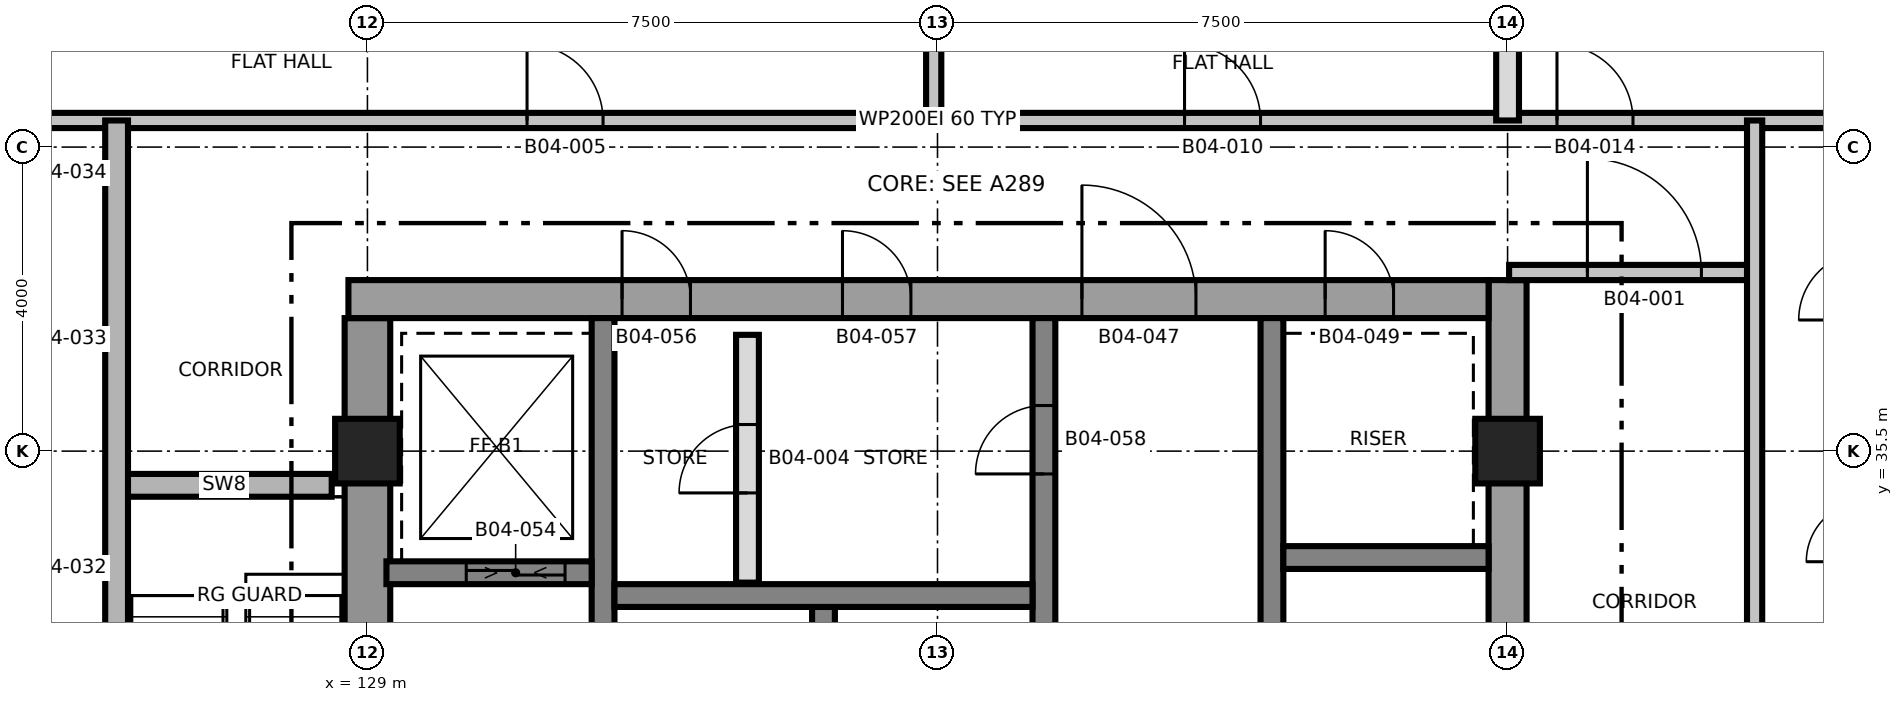
"""IFC4 building model, lengths in metres.
Left out: names, types, materials, properties, quantities, classifications, styles, units other than length and angle.
Written with IfcOpenShell. Run it as: python <this file> out.ifc"""

import sys

from ifc_helpers import new_model, si_unit, direction, frame, frame_2d, origin, origin_2d, place, context, subcontext, project, spatial, rectangle, extrude, element, fill, save


model = new_model("IFC4")
c1 = context("Model", 3, precision=1e-05, world=origin(), true_north=direction((0.0, 1.0)))
c2 = subcontext(c1, "Body", "Model", "MODEL_VIEW")
j1 = project(units=[si_unit("LENGTHUNIT", "METRE"), si_unit("PLANEANGLEUNIT", "RADIAN")], contexts=[c1])
p1 = place(None, origin())
s1 = spatial("IfcSite", under=j1, at=p1, CompositionType="ELEMENT")
p2 = place(p1, origin())
s2 = spatial("IfcBuilding", under=s1, at=p2, CompositionType="ELEMENT")
p3 = place(p2, frame((0.0, 0.0, 66.8)))
s3 = spatial("IfcBuildingStorey", under=s2, at=p3, CompositionType="ELEMENT", Elevation=66.8)
p4 = place(p3, frame((129.0, 24.75, 0.0), z_axis=(0.0, 0.0, 1.0), x_axis=(0.0, 1.0, 0.0)))
e1 = element("IfcWall", 1, at=p4, inside=s3, PredefinedType="SHEAR", context=c2, shape_type="SweptSolid", body=[
    extrude(rectangle(XDim=12.5, YDim=0.6, at=frame_2d((6.25, 0.0))), origin(), (0.0, 0.0, 1.0), 3.7),
])
p5 = place(p4, frame((5.15, 0.0, 0.0)))
e2 = element("IfcOpeningElement", 2, at=p5, cuts=e1, PredefinedType="OPENING", context=c2, shape_type="SweptSolid", body=[
    extrude(rectangle(XDim=1.0, YDim=2.1, at=frame_2d((0.5, 1.05))), frame((0.0, 0.31, 0.0), z_axis=(0.0, -1.0, 0.0), x_axis=(1.0, 0.0, 0.0)), (0.0, 0.0, 1.0), 0.62),
])
p6 = place(p3, frame((144.0, 24.25, 0.0), z_axis=(0.0, 0.0, 1.0), x_axis=(0.0, 1.0, 0.0)))
e3 = element("IfcWall", 3, at=p6, inside=s3, PredefinedType="SHEAR", context=c2, shape_type="SweptSolid", body=[
    extrude(rectangle(XDim=13.5, YDim=0.5, at=frame_2d((6.75, 0.0))), origin(), (0.0, 0.0, 1.0), 3.7),
])
p7 = place(p3, frame((128.75, 37.5, 0.0), z_axis=(0.0, 0.0, 1.0), x_axis=(1.0, 0.0, 0.0)))
e4 = element("IfcWall", 4, at=p7, inside=s3, PredefinedType="SHEAR", context=c2, shape_type="SweptSolid", body=[
    extrude(rectangle(XDim=15.0, YDim=0.5, at=frame_2d((7.5, 0.0))), origin(), (0.0, 0.0, 1.0), 3.7),
])
p8 = place(p7, frame((9.65, 0.0, 0.0)))
e5 = element("IfcOpeningElement", 5, at=p8, cuts=e4, PredefinedType="OPENING", context=c2, shape_type="SweptSolid", body=[
    extrude(rectangle(XDim=1.5, YDim=2.1, at=frame_2d((0.75, 1.05))), frame((0.0, 0.26, 0.0), z_axis=(0.0, -1.0, 0.0), x_axis=(1.0, 0.0, 0.0)), (0.0, 0.0, 1.0), 0.52),
])
p9 = place(p7, frame((12.85, 0.0, 0.0)))
e6 = element("IfcOpeningElement", 6, at=p9, cuts=e4, PredefinedType="OPENING", context=c2, shape_type="SweptSolid", body=[
    extrude(rectangle(XDim=0.9, YDim=2.1, at=frame_2d((0.45, 1.05))), frame((0.0, 0.26, 0.0), z_axis=(0.0, -1.0, 0.0), x_axis=(1.0, 0.0, 0.0)), (0.0, 0.0, 1.0), 0.52),
])
p10 = place(p7, frame((3.6, 0.0, 0.0)))
e7 = element("IfcOpeningElement", 7, at=p10, cuts=e4, PredefinedType="OPENING", context=c2, shape_type="SweptSolid", body=[
    extrude(rectangle(XDim=0.9, YDim=2.1, at=frame_2d((0.45, 1.05))), frame((0.0, 0.26, 0.0), z_axis=(0.0, -1.0, 0.0), x_axis=(1.0, 0.0, 0.0)), (0.0, 0.0, 1.0), 0.52),
])
p11 = place(p7, frame((6.5, 0.0, 0.0)))
e8 = element("IfcOpeningElement", 8, at=p11, cuts=e4, PredefinedType="OPENING", context=c2, shape_type="SweptSolid", body=[
    extrude(rectangle(XDim=0.9, YDim=2.1, at=frame_2d((0.45, 1.05))), frame((0.0, 0.26, 0.0), z_axis=(0.0, -1.0, 0.0), x_axis=(1.0, 0.0, 0.0)), (0.0, 0.0, 1.0), 0.52),
])
p12 = place(p3, frame((132.1, 24.75, 0.0), z_axis=(0.0, 0.0, 1.0), x_axis=(0.0, 1.0, 0.0)))
e9 = element("IfcWall", 9, at=p12, inside=s3, PredefinedType="SHEAR", context=c2, shape_type="SweptSolid", body=[
    extrude(rectangle(XDim=12.5, YDim=0.3, at=frame_2d((6.25, 0.0))), origin(), (0.0, 0.0, 1.0), 3.7),
])
p13 = place(p12, frame((3.9, 0.0, 0.0)))
e10 = element("IfcOpeningElement", 10, at=p13, cuts=e9, PredefinedType="OPENING", context=c2, shape_type="SweptSolid", body=[
    extrude(rectangle(XDim=1.2, YDim=2.1, at=frame_2d((0.6, 1.05))), frame((0.0, 0.16, 0.0), z_axis=(0.0, -1.0, 0.0), x_axis=(1.0, 0.0, 0.0)), (0.0, 0.0, 1.0), 0.32),
])
p14 = place(p3, frame((137.9, 24.75, 0.0), z_axis=(0.0, 0.0, 1.0), x_axis=(0.0, 1.0, 0.0)))
e11 = element("IfcWall", 11, at=p14, inside=s3, PredefinedType="SHEAR", context=c2, shape_type="SweptSolid", body=[
    extrude(rectangle(XDim=12.5, YDim=0.3, at=frame_2d((6.25, 0.0))), origin(), (0.0, 0.0, 1.0), 3.7),
])
p15 = place(p14, frame((3.95, 0.0, 0.0)))
e12 = element("IfcOpeningElement", 12, at=p15, cuts=e11, PredefinedType="OPENING", context=c2, shape_type="SweptSolid", body=[
    extrude(rectangle(XDim=1.5, YDim=2.1, at=frame_2d((0.75, 1.05))), frame((0.0, 0.16, 0.0), z_axis=(0.0, -1.0, 0.0), x_axis=(1.0, 0.0, 0.0)), (0.0, 0.0, 1.0), 0.32),
])
p16 = place(p14, frame((10.45, 0.0, 0.0)))
e13 = element("IfcOpeningElement", 13, at=p16, cuts=e11, PredefinedType="OPENING", context=c2, shape_type="SweptSolid", body=[
    extrude(rectangle(XDim=0.9, YDim=2.1, at=frame_2d((0.45, 1.05))), frame((0.0, 0.16, 0.0), z_axis=(0.0, -1.0, 0.0), x_axis=(1.0, 0.0, 0.0)), (0.0, 0.0, 1.0), 0.32),
])
p17 = place(p3, frame((140.9, 24.75, 0.0), z_axis=(0.0, 0.0, 1.0), x_axis=(0.0, 1.0, 0.0)))
e14 = element("IfcWall", 14, at=p17, inside=s3, PredefinedType="SHEAR", context=c2, shape_type="SweptSolid", body=[
    extrude(rectangle(XDim=12.5, YDim=0.3, at=frame_2d((6.25, 0.0))), origin(), (0.0, 0.0, 1.0), 3.7),
])
p18 = place(p17, frame((5.9, 0.0, 0.0)))
e15 = element("IfcOpeningElement", 15, at=p18, cuts=e14, PredefinedType="OPENING", context=c2, shape_type="SweptSolid", body=[
    extrude(rectangle(XDim=1.2, YDim=2.1, at=frame_2d((0.6, 1.05))), frame((0.0, 0.16, 0.0), z_axis=(0.0, -1.0, 0.0), x_axis=(1.0, 0.0, 0.0)), (0.0, 0.0, 1.0), 0.32),
])
p19 = place(p3, frame((135.0, 30.85, 0.0), z_axis=(0.0, 0.0, 1.0), x_axis=(0.0, 1.0, 0.0)))
e16 = element("IfcWall", 16, at=p19, inside=s3, PredefinedType="SHEAR", context=c2, shape_type="SweptSolid", body=[
    extrude(rectangle(XDim=2.6, YDim=0.3, at=frame_2d((1.3, 0.0))), origin(), (0.0, 0.0, 1.0), 3.7),
])
p20 = place(p3, frame((132.25, 33.6, 0.0), z_axis=(0.0, 0.0, 1.0), x_axis=(1.0, 0.0, 0.0)))
e17 = element("IfcWall", 17, at=p20, inside=s3, PredefinedType="SHEAR", context=c2, shape_type="SweptSolid", body=[
    extrude(rectangle(XDim=5.5, YDim=0.3, at=frame_2d((2.75, 0.0))), origin(), (0.0, 0.0, 1.0), 3.7),
])
p21 = place(p3, frame((129.25, 33.9, 0.0), z_axis=(0.0, 0.0, 1.0), x_axis=(1.0, 0.0, 0.0)))
e18 = element("IfcWall", 18, at=p21, inside=s3, PredefinedType="SHEAR", context=c2, shape_type="SweptSolid", body=[
    extrude(rectangle(XDim=2.7, YDim=0.3, at=frame_2d((1.35, 0.0))), origin(), (0.0, 0.0, 1.0), 3.7),
])
p22 = place(p21, frame((1.05, 0.0, 0.0)))
e19 = element("IfcOpeningElement", 19, at=p22, cuts=e18, PredefinedType="OPENING", context=c2, shape_type="SweptSolid", body=[
    extrude(rectangle(XDim=1.3, YDim=2.4, at=frame_2d((0.65, 1.2))), frame((0.0, 0.16, 0.0), z_axis=(0.0, -1.0, 0.0), x_axis=(1.0, 0.0, 0.0)), (0.0, 0.0, 1.0), 0.32),
])
p23 = place(p3, frame((141.05, 34.1, 0.0), z_axis=(0.0, 0.0, 1.0), x_axis=(1.0, 0.0, 0.0)))
e20 = element("IfcWall", 20, at=p23, inside=s3, PredefinedType="SHEAR", context=c2, shape_type="SweptSolid", body=[
    extrude(rectangle(XDim=2.7, YDim=0.3, at=frame_2d((1.35, 0.0))), origin(), (0.0, 0.0, 1.0), 3.7),
])
for number, where, z_axis, x_axis in (
    (21, (129.0, 35.5, 0.0), (0.0, 0.0, 1.0), (1.0, 0.0, 0.0)),
    (22, (144.0, 35.5, 0.0), (0.0, 0.0, 1.0), (1.0, 0.0, 0.0)),
):
    element("IfcColumn", number, at=place(p3, frame(where, z_axis=z_axis, x_axis=x_axis)), inside=s3, PredefinedType="COLUMN", context=c2, shape_type="SweptSolid", body=[
        extrude(rectangle(XDim=0.85, YDim=0.85, at=origin_2d()), origin(), (0.0, 0.0, 1.0), 3.7),
    ])
p24 = place(p3, frame((125.7, 35.05, 0.0), z_axis=(0.0, 0.0, 1.0), x_axis=(1.0, 0.0, 0.0)))
e23 = element("IfcWall", 23, at=p24, inside=s3, PredefinedType="SHEAR", context=c2, shape_type="SweptSolid", body=[
    extrude(rectangle(XDim=2.83, YDim=0.3, at=frame_2d((1.415, 0.0))), origin(), (0.0, 0.0, 1.0), 3.4),
])
p25 = place(p3, frame((144.02, 37.85, 0.0), z_axis=(0.0, 0.0, 1.0), x_axis=(1.0, 0.0, 0.0)))
e24 = element("IfcWall", 24, at=p25, inside=s3, PredefinedType="PARTITIONING", context=c2, shape_type="SweptSolid", body=[
    extrude(rectangle(XDim=3.23, YDim=0.2, at=frame_2d((1.615, 0.0))), origin(), (0.0, 0.0, 1.0), 3.4),
])
p26 = place(p25, frame((1.03, 0.0, 0.0)))
e25 = element("IfcOpeningElement", 25, at=p26, cuts=e24, PredefinedType="OPENING", context=c2, shape_type="SweptSolid", body=[
    extrude(rectangle(XDim=1.5, YDim=2.1, at=frame_2d((0.75, 1.05))), frame((0.0, 0.11, 0.0), z_axis=(0.0, -1.0, 0.0), x_axis=(1.0, 0.0, 0.0)), (0.0, 0.0, 1.0), 0.22),
])
p27 = place(p3, frame((119.17, 39.85, 0.0), z_axis=(0.0, 0.0, 1.0), x_axis=(1.0, 0.0, 0.0)))
e26 = element("IfcWall", 26, at=p27, inside=s3, PredefinedType="PARTITIONING", context=c2, shape_type="SweptSolid", body=[
    extrude(rectangle(XDim=34.66, YDim=0.2, at=frame_2d((17.33, 0.0))), origin(), (0.0, 0.0, 1.0), 3.4),
])
p28 = place(p27, frame((11.93, 0.0, 0.0)))
e27 = element("IfcOpeningElement", 27, at=p28, cuts=e26, PredefinedType="OPENING", context=c2, shape_type="SweptSolid", body=[
    extrude(rectangle(XDim=1.0, YDim=2.1, at=frame_2d((0.5, 1.05))), frame((0.0, 0.11, 0.0), z_axis=(0.0, -1.0, 0.0), x_axis=(1.0, 0.0, 0.0)), (0.0, 0.0, 1.0), 0.22),
])
p29 = place(p27, frame((20.58, 0.0, 0.0)))
e28 = element("IfcOpeningElement", 28, at=p29, cuts=e26, PredefinedType="OPENING", context=c2, shape_type="SweptSolid", body=[
    extrude(rectangle(XDim=1.0, YDim=2.1, at=frame_2d((0.5, 1.05))), frame((0.0, 0.11, 0.0), z_axis=(0.0, -1.0, 0.0), x_axis=(1.0, 0.0, 0.0)), (0.0, 0.0, 1.0), 0.22),
])
p30 = place(p27, frame((25.48, 0.0, 0.0)))
e29 = element("IfcOpeningElement", 29, at=p30, cuts=e26, PredefinedType="OPENING", context=c2, shape_type="SweptSolid", body=[
    extrude(rectangle(XDim=1.0, YDim=2.1, at=frame_2d((0.5, 1.05))), frame((0.0, 0.11, 0.0), z_axis=(0.0, -1.0, 0.0), x_axis=(1.0, 0.0, 0.0)), (0.0, 0.0, 1.0), 0.22),
])
p31 = place(p3, frame((125.7, 22.15, 0.0), z_axis=(0.0, 0.0, 1.0), x_axis=(0.0, 1.0, 0.0)))
e30 = element("IfcWall", 30, at=p31, inside=s3, PredefinedType="SHEAR", context=c2, shape_type="SweptSolid", body=[
    extrude(rectangle(XDim=17.7, YDim=0.3, at=frame_2d((8.85, 0.0))), origin(), (0.0, 0.0, 1.0), 3.4),
])
p32 = place(p31, frame((2.7, 0.0, 0.0)))
e31 = element("IfcOpeningElement", 31, at=p32, cuts=e30, PredefinedType="OPENING", context=c2, shape_type="SweptSolid", body=[
    extrude(rectangle(XDim=1.0, YDim=2.1, at=frame_2d((0.5, 1.05))), frame((0.0, 0.16, 0.0), z_axis=(0.0, -1.0, 0.0), x_axis=(1.0, 0.0, 0.0)), (0.0, 0.0, 1.0), 0.32),
])
p33 = place(p3, frame((134.0, 33.77, 0.0), z_axis=(0.0, 0.0, 1.0), x_axis=(0.0, 1.0, 0.0)))
e32 = element("IfcWall", 32, at=p33, inside=s3, PredefinedType="PARTITIONING", context=c2, shape_type="SweptSolid", body=[
    extrude(rectangle(XDim=3.26, YDim=0.3, at=frame_2d((1.63, 0.0))), origin(), (0.0, 0.0, 1.0), 3.4),
])
p34 = place(p33, frame((1.18, 0.0, 0.0)))
e33 = element("IfcOpeningElement", 33, at=p34, cuts=e32, PredefinedType="OPENING", context=c2, shape_type="SweptSolid", body=[
    extrude(rectangle(XDim=0.9, YDim=2.1, at=frame_2d((0.45, 1.05))), frame((0.0, 0.16, 0.0), z_axis=(0.0, -1.0, 0.0), x_axis=(1.0, 0.0, 0.0)), (0.0, 0.0, 1.0), 0.32),
])
p35 = place(p3, frame((136.45, 39.85, 0.0), z_axis=(0.0, 0.0, 1.0), x_axis=(0.0, 1.0, 0.0)))
e34 = element("IfcWall", 34, at=p35, inside=s3, PredefinedType="PARTITIONING", context=c2, shape_type="SweptSolid", body=[
    extrude(rectangle(XDim=6.98, YDim=0.2, at=frame_2d((3.49, 0.0))), origin(), (0.0, 0.0, 1.0), 3.4),
])
p36 = place(p3, frame((144.0, 39.85, 0.0), z_axis=(0.0, 0.0, 1.0), x_axis=(0.0, 1.0, 0.0)))
e35 = element("IfcWall", 35, at=p36, inside=s3, PredefinedType="PARTITIONING", context=c2, shape_type="SweptSolid", body=[
    extrude(rectangle(XDim=6.98, YDim=0.3, at=frame_2d((3.49, 0.0))), origin(), (0.0, 0.0, 1.0), 3.4),
])
p37 = place(p3, frame((147.25, 22.15, 0.0), z_axis=(0.0, 0.0, 1.0), x_axis=(0.0, 1.0, 0.0)))
e36 = element("IfcWall", 36, at=p37, inside=s3, PredefinedType="PARTITIONING", context=c2, shape_type="SweptSolid", body=[
    extrude(rectangle(XDim=17.7, YDim=0.2, at=frame_2d((8.85, 0.0))), origin(), (0.0, 0.0, 1.0), 3.4),
])
p38 = place(p37, frame((2.65, 0.0, 0.0)))
e37 = element("IfcOpeningElement", 37, at=p38, cuts=e36, PredefinedType="OPENING", context=c2, shape_type="SweptSolid", body=[
    extrude(rectangle(XDim=1.0, YDim=2.1, at=frame_2d((0.5, 1.05))), frame((0.0, 0.11, 0.0), z_axis=(0.0, -1.0, 0.0), x_axis=(1.0, 0.0, 0.0)), (0.0, 0.0, 1.0), 0.22),
])
p39 = place(p26, origin())
e38 = element("IfcDoor", 38, at=p39, inside=s3, OperationType="SINGLE_SWING_LEFT", PredefinedType="DOOR", context=c2, shape_type="SweptSolid", body=[
    extrude(rectangle(XDim=1.5, YDim=2.1, at=frame_2d((0.75, 1.05))), frame((0.0, 0.025, 0.0), z_axis=(0.0, -1.0, 0.0), x_axis=(1.0, 0.0, 0.0)), (0.0, 0.0, 1.0), 0.05),
])
fill(e25, e38)
p40 = place(p34, origin())
e39 = element("IfcDoor", 39, at=p40, inside=s3, OperationType="SINGLE_SWING_RIGHT", PredefinedType="DOOR", context=c2, shape_type="SweptSolid", body=[
    extrude(rectangle(XDim=0.9, YDim=2.1, at=frame_2d((0.45, 1.05))), frame((0.0, 0.025, 0.0), z_axis=(0.0, -1.0, 0.0), x_axis=(1.0, 0.0, 0.0)), (0.0, 0.0, 1.0), 0.05),
])
fill(e33, e39)
p41 = place(p28, origin())
e40 = element("IfcDoor", 40, at=p41, inside=s3, OperationType="SINGLE_SWING_LEFT", PredefinedType="DOOR", context=c2, shape_type="SweptSolid", body=[
    extrude(rectangle(XDim=1.0, YDim=2.1, at=frame_2d((0.5, 1.05))), frame((0.0, 0.025, 0.0), z_axis=(0.0, -1.0, 0.0), x_axis=(1.0, 0.0, 0.0)), (0.0, 0.0, 1.0), 0.05),
])
fill(e27, e40)
p42 = place(p29, origin())
e41 = element("IfcDoor", 41, at=p42, inside=s3, OperationType="SINGLE_SWING_RIGHT", PredefinedType="DOOR", context=c2, shape_type="SweptSolid", body=[
    extrude(rectangle(XDim=1.0, YDim=2.1, at=frame_2d((0.5, 1.05))), frame((0.0, 0.025, 0.0), z_axis=(0.0, -1.0, 0.0), x_axis=(1.0, 0.0, 0.0)), (0.0, 0.0, 1.0), 0.05),
])
fill(e28, e41)
p43 = place(p30, origin())
e42 = element("IfcDoor", 42, at=p43, inside=s3, OperationType="SINGLE_SWING_RIGHT", PredefinedType="DOOR", context=c2, shape_type="SweptSolid", body=[
    extrude(rectangle(XDim=1.0, YDim=2.1, at=frame_2d((0.5, 1.05))), frame((0.0, 0.025, 0.0), z_axis=(0.0, -1.0, 0.0), x_axis=(1.0, 0.0, 0.0)), (0.0, 0.0, 1.0), 0.05),
])
fill(e29, e42)
p44 = place(p8, origin())
e43 = element("IfcDoor", 43, at=p44, inside=s3, OperationType="SINGLE_SWING_RIGHT", PredefinedType="DOOR", context=c2, shape_type="SweptSolid", body=[
    extrude(rectangle(XDim=1.5, YDim=2.1, at=frame_2d((0.75, 1.05))), frame((0.0, 0.025, 0.0), z_axis=(0.0, -1.0, 0.0), x_axis=(1.0, 0.0, 0.0)), (0.0, 0.0, 1.0), 0.05),
])
fill(e5, e43)
p45 = place(p9, origin())
e44 = element("IfcDoor", 44, at=p45, inside=s3, OperationType="SINGLE_SWING_RIGHT", PredefinedType="DOOR", context=c2, shape_type="SweptSolid", body=[
    extrude(rectangle(XDim=0.9, YDim=2.1, at=frame_2d((0.45, 1.05))), frame((0.0, 0.025, 0.0), z_axis=(0.0, -1.0, 0.0), x_axis=(1.0, 0.0, 0.0)), (0.0, 0.0, 1.0), 0.05),
])
fill(e6, e44)
p46 = place(p22, origin())
e45 = element("IfcDoor", 45, at=p46, inside=s3, OperationType="SLIDING_TO_LEFT", PredefinedType="DOOR", context=c2, shape_type="SweptSolid", body=[
    extrude(rectangle(XDim=1.3, YDim=2.4, at=frame_2d((0.65, 1.2))), frame((0.0, 0.025, 0.0), z_axis=(0.0, -1.0, 0.0), x_axis=(1.0, 0.0, 0.0)), (0.0, 0.0, 1.0), 0.05),
])
fill(e19, e45)
p47 = place(p10, origin())
e46 = element("IfcDoor", 46, at=p47, inside=s3, OperationType="SINGLE_SWING_LEFT", PredefinedType="DOOR", context=c2, shape_type="SweptSolid", body=[
    extrude(rectangle(XDim=0.9, YDim=2.1, at=frame_2d((0.45, 1.05))), frame((0.0, 0.025, 0.0), z_axis=(0.0, -1.0, 0.0), x_axis=(1.0, 0.0, 0.0)), (0.0, 0.0, 1.0), 0.05),
])
fill(e7, e46)
p48 = place(p11, origin())
e47 = element("IfcDoor", 47, at=p48, inside=s3, OperationType="SINGLE_SWING_RIGHT", PredefinedType="DOOR", context=c2, shape_type="SweptSolid", body=[
    extrude(rectangle(XDim=0.9, YDim=2.1, at=frame_2d((0.45, 1.05))), frame((0.0, 0.025, 0.0), z_axis=(0.0, -1.0, 0.0), x_axis=(1.0, 0.0, 0.0)), (0.0, 0.0, 1.0), 0.05),
])
fill(e8, e47)
p49 = place(p16, origin())
e48 = element("IfcDoor", 48, at=p49, inside=s3, OperationType="SINGLE_SWING_RIGHT", PredefinedType="DOOR", context=c2, shape_type="SweptSolid", body=[
    extrude(rectangle(XDim=0.9, YDim=2.1, at=frame_2d((0.45, 1.05))), frame((0.0, 0.025, 0.0), z_axis=(0.0, -1.0, 0.0), x_axis=(1.0, 0.0, 0.0)), (0.0, 0.0, 1.0), 0.05),
])
fill(e13, e48)
save(model, sys.argv[1])
